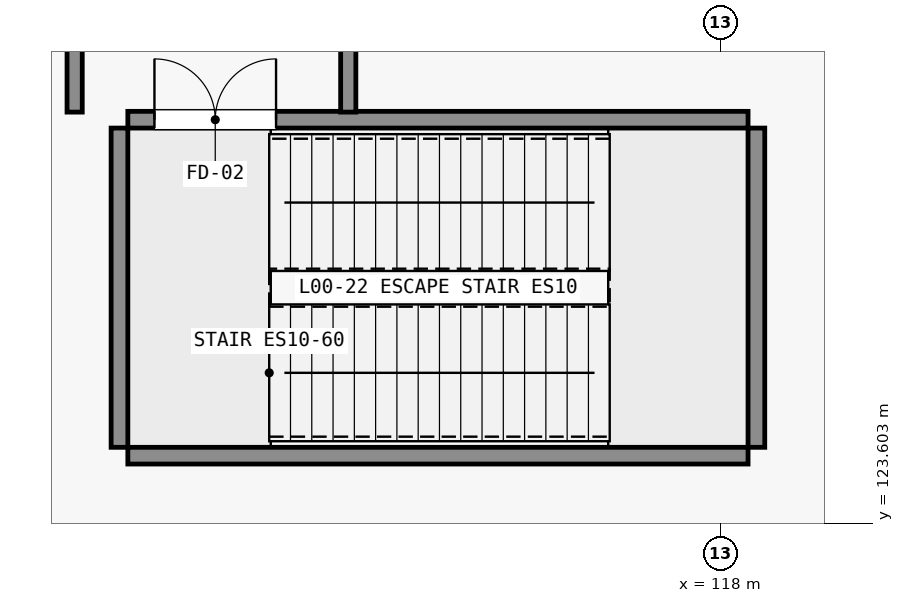
"""IFC4 building model, lengths in metres.
Left out: names, types, materials, properties, quantities, classifications, styles, units other than length and angle.
Written with IfcOpenShell. Run it as: python <this file> out.ifc"""

import sys

from ifc_helpers import new_model, si_unit, direction, frame, frame_2d, origin, place, context, subcontext, project, spatial, rectangle, extrude, element, fill, save


model = new_model("IFC4")
c1 = context("Model", 3, precision=1e-05, world=origin(), true_north=direction((0.0, 1.0)))
c2 = subcontext(c1, "Body", "Model", "MODEL_VIEW")
j1 = project(units=[si_unit("LENGTHUNIT", "METRE"), si_unit("PLANEANGLEUNIT", "RADIAN")], contexts=[c1])
p1 = place(None, origin())
s1 = spatial("IfcSite", under=j1, at=p1, CompositionType="ELEMENT")
p2 = place(p1, origin())
s2 = spatial("IfcBuilding", under=s1, at=p2, CompositionType="ELEMENT")
p3 = place(p2, origin())
s3 = spatial("IfcBuildingStorey", under=s2, at=p3, CompositionType="ELEMENT", Elevation=0.0)
p4 = place(p3, frame((110.2, 124.49, 0.0), z_axis=(0.0, 0.0, 1.0), x_axis=(1.0, 0.0, 0.0)))
e1 = element("IfcWall", 1, at=p4, inside=s3, PredefinedType="SHEAR", context=c2, shape_type="SweptSolid", body=[
    extrude(rectangle(XDim=8.16, YDim=0.22, at=frame_2d((4.08, 0.0))), origin(), (0.0, 0.0, 1.0), 6.0),
])
p5 = place(p3, frame((110.2, 128.91, 0.0), z_axis=(0.0, 0.0, 1.0), x_axis=(1.0, 0.0, 0.0)))
e2 = element("IfcWall", 2, at=p5, inside=s3, PredefinedType="SHEAR", context=c2, shape_type="SweptSolid", body=[
    extrude(rectangle(XDim=8.16, YDim=0.22, at=frame_2d((4.08, 0.0))), origin(), (0.0, 0.0, 1.0), 6.0),
])
p6 = place(p5, frame((0.35, 0.0, 0.0)))
e3 = element("IfcOpeningElement", 3, at=p6, cuts=e2, PredefinedType="OPENING", context=c2, shape_type="SweptSolid", body=[
    extrude(rectangle(XDim=1.6, YDim=2.2, at=frame_2d((0.8, 1.1))), frame((0.0, 0.12, 0.0), z_axis=(0.0, -1.0, 0.0), x_axis=(1.0, 0.0, 0.0)), (0.0, 0.0, 1.0), 0.24),
])
for number, where, z_axis, x_axis in (
    (4, (110.09, 124.6, 0.0), (0.0, 0.0, 1.0), (0.0, 1.0, 0.0)),
    (5, (118.47, 124.6, 0.0), (0.0, 0.0, 1.0), (0.0, 1.0, 0.0)),
):
    element("IfcWall", number, at=place(p3, frame(where, z_axis=z_axis, x_axis=x_axis)), inside=s3, PredefinedType="SHEAR", context=c2, shape_type="SweptSolid", body=[
        extrude(rectangle(XDim=4.2, YDim=0.22, at=frame_2d((2.1, 0.0))), origin(), (0.0, 0.0, 1.0), 6.0),
    ])
p7 = place(p3, frame((109.5, 129.01, 0.0), z_axis=(0.0, 0.0, 1.0), x_axis=(0.0, 1.0, 0.0)))
e6 = element("IfcWall", 6, at=p7, inside=s3, PredefinedType="STANDARD", context=c2, shape_type="SweptSolid", body=[
    extrude(rectangle(XDim=2.71, YDim=0.2, at=frame_2d((1.355, 0.0))), origin(), (0.0, 0.0, 1.0), 5.028),
])
p8 = place(p7, frame((0.855, 0.0, 0.0)))
e7 = element("IfcOpeningElement", 7, at=p8, cuts=e6, PredefinedType="OPENING", context=c2, shape_type="SweptSolid", body=[
    extrude(rectangle(XDim=1.0, YDim=2.15, at=frame_2d((0.5, 1.075))), frame((0.0, 0.11, 0.0), z_axis=(0.0, -1.0, 0.0), x_axis=(1.0, 0.0, 0.0)), (0.0, 0.0, 1.0), 0.22),
])
p9 = place(p3, frame((113.1, 129.01, 0.0), z_axis=(0.0, 0.0, 1.0), x_axis=(0.0, 1.0, 0.0)))
e8 = element("IfcWall", 8, at=p9, inside=s3, PredefinedType="STANDARD", context=c2, shape_type="SweptSolid", body=[
    extrude(rectangle(XDim=2.71, YDim=0.2, at=frame_2d((1.355, 0.0))), origin(), (0.0, 0.0, 1.0), 5.028),
])
p10 = place(p6, origin())
e9 = element("IfcDoor", 9, at=p10, inside=s3, OperationType="DOUBLE_DOOR_SINGLE_SWING", PredefinedType="DOOR", context=c2, shape_type="SweptSolid", body=[
    extrude(rectangle(XDim=1.6, YDim=2.2, at=frame_2d((0.8, 1.1))), frame((0.0, 0.025, 0.0), z_axis=(0.0, -1.0, 0.0), x_axis=(1.0, 0.0, 0.0)), (0.0, 0.0, 1.0), 0.05),
])
fill(e3, e9)
save(model, sys.argv[1])
